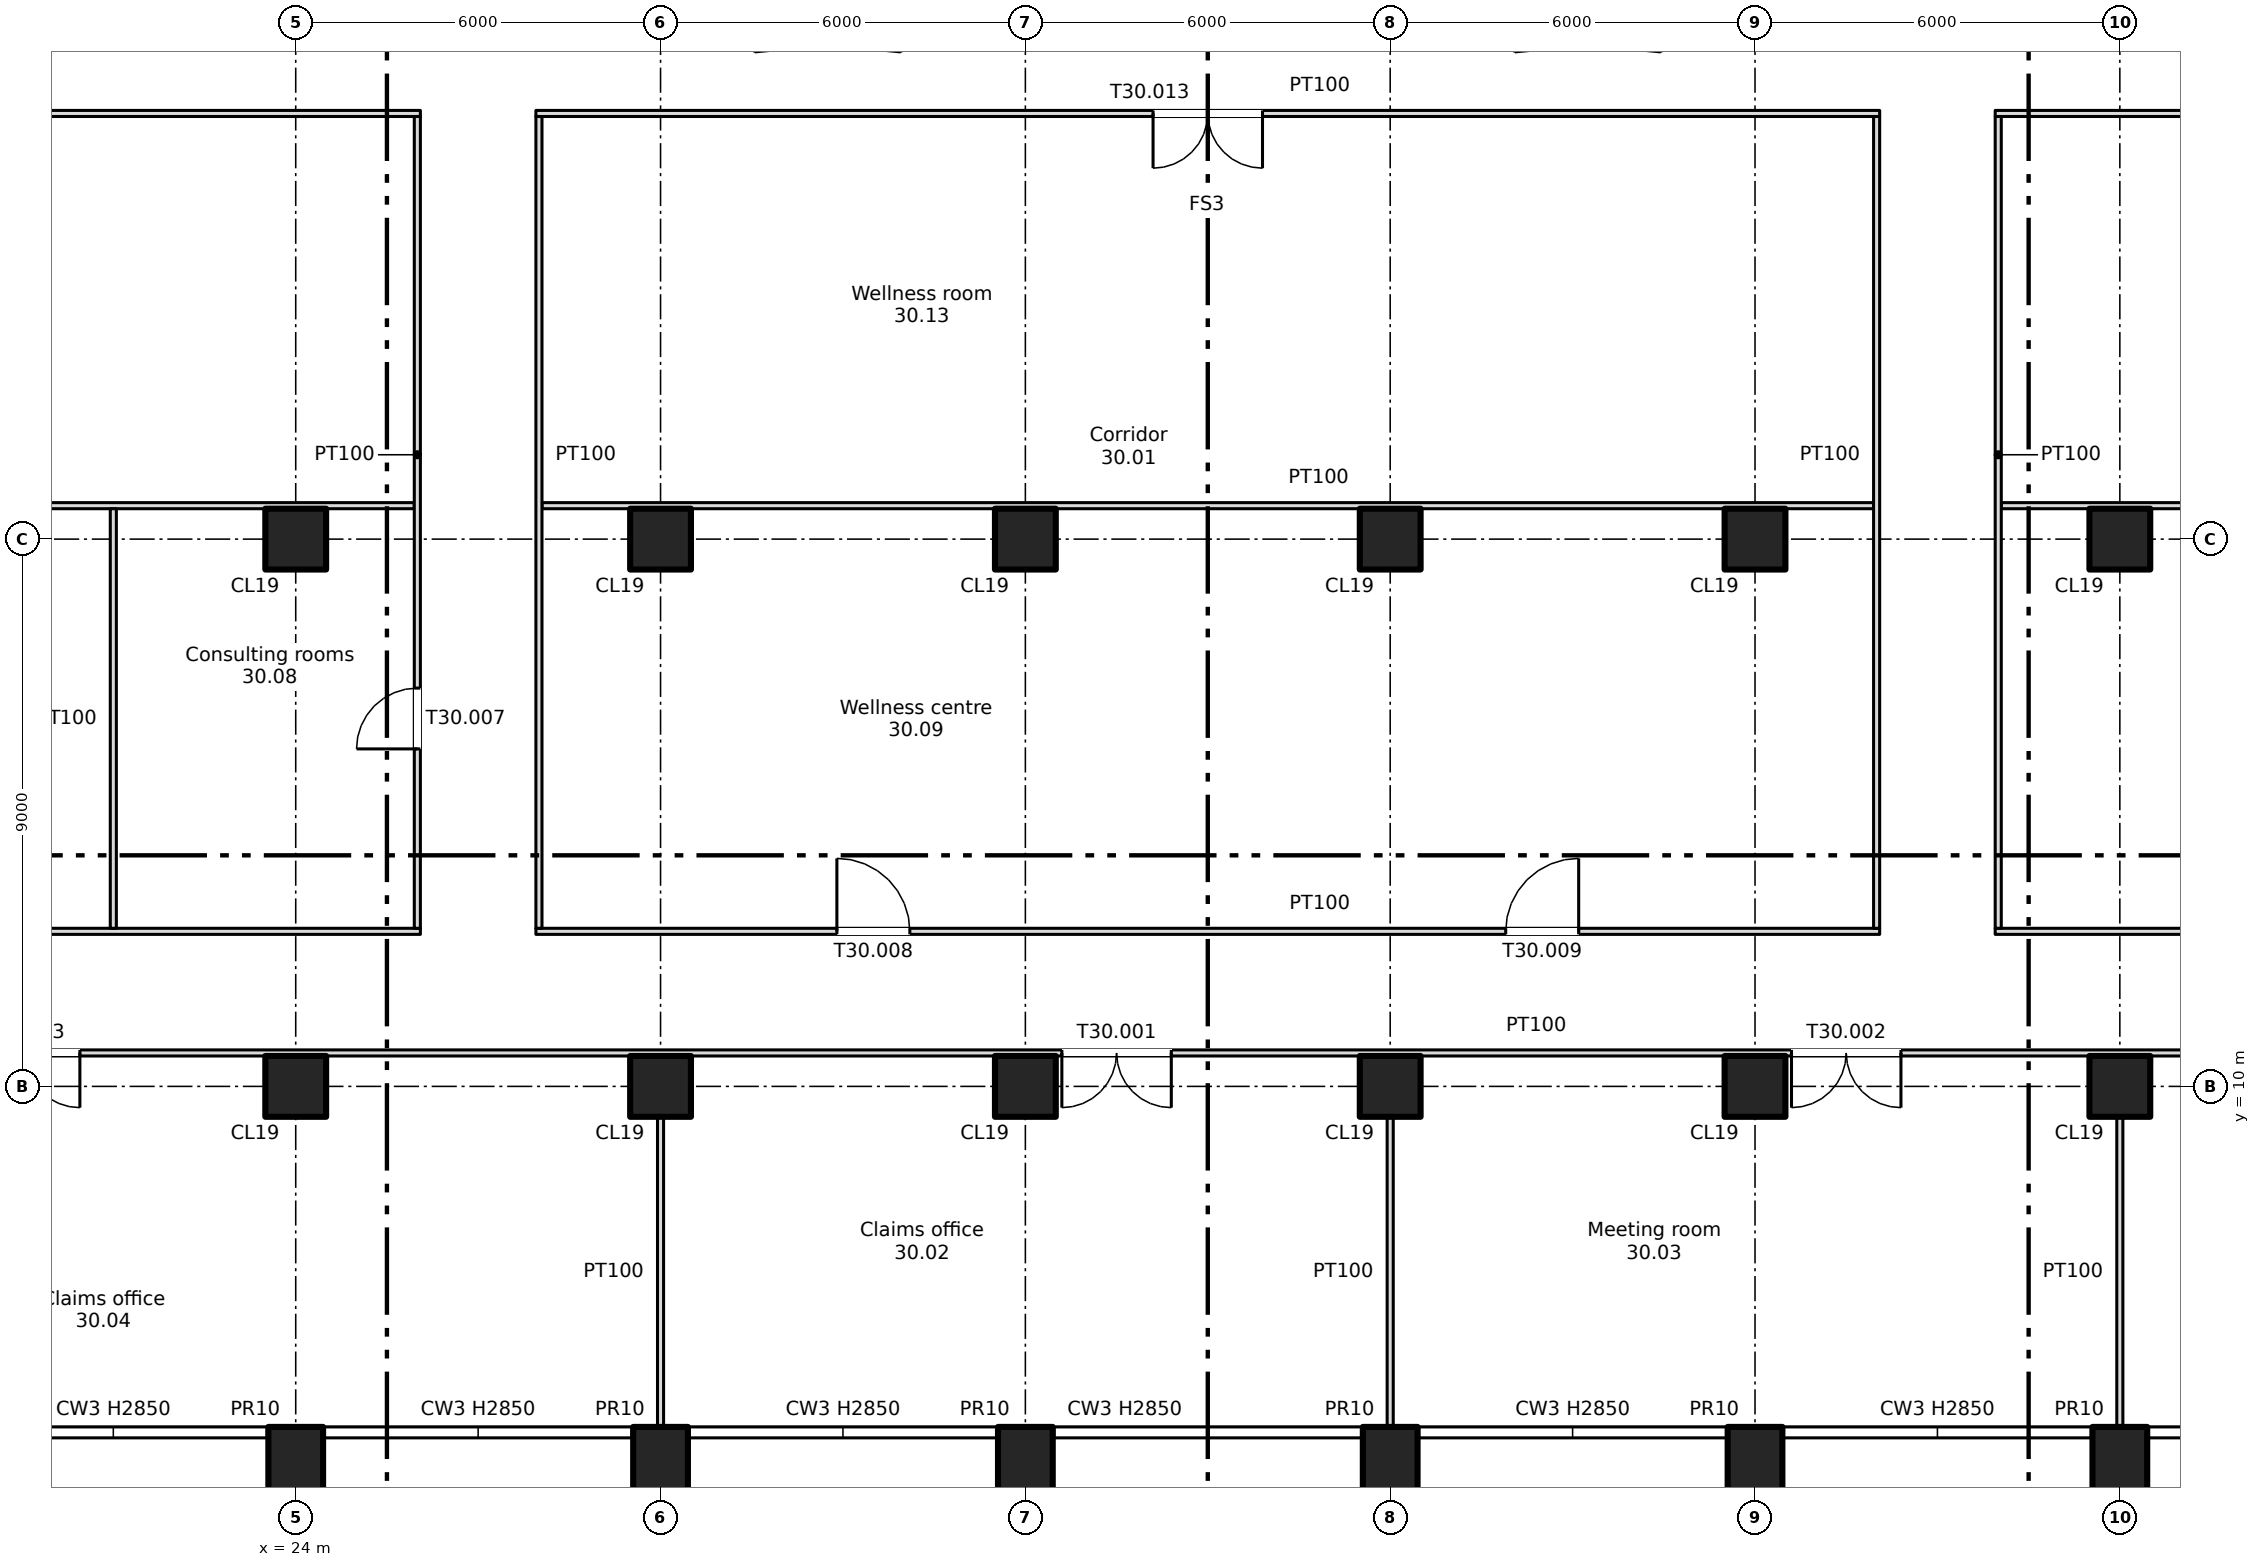
"""IFC4 building model, lengths in metres.
Left out: names, types, materials, properties, quantities, classifications, styles, units other than length and angle.
Written with IfcOpenShell. Run it as: python <this file> out.ifc"""

import sys

from ifc_helpers import new_model, si_unit, direction, frame, frame_2d, origin, origin_2d, place, context, subcontext, project, spatial, rectangle, extrude, element, fill, save


model = new_model("IFC4")
c1 = context("Model", 3, precision=1e-05, world=origin(), true_north=direction((0.0, 1.0)))
c2 = subcontext(c1, "Body", "Model", "MODEL_VIEW")
j1 = project(units=[si_unit("LENGTHUNIT", "METRE"), si_unit("PLANEANGLEUNIT", "RADIAN")], contexts=[c1])
p1 = place(None, origin())
s1 = spatial("IfcSite", under=j1, at=p1, CompositionType="ELEMENT")
p2 = place(p1, origin())
s2 = spatial("IfcBuilding", under=s1, at=p2, CompositionType="ELEMENT")
p3 = place(p2, frame((0.0, 0.0, 211.75)))
s3 = spatial("IfcBuildingStorey", under=s2, at=p3, CompositionType="ELEMENT", Elevation=211.75)
for number, where, z_axis, x_axis in (
    (1, (24.0, 3.7, -0.4), (0.0, 0.0, 1.0), (1.0, 0.0, 0.0)),
    (2, (30.0, 3.7, -0.4), (0.0, 0.0, 1.0), (1.0, 0.0, 0.0)),
    (3, (36.0, 3.7, -0.4), (0.0, 0.0, 1.0), (1.0, 0.0, 0.0)),
    (4, (42.0, 3.7, -0.4), (0.0, 0.0, 1.0), (1.0, 0.0, 0.0)),
    (5, (48.0, 3.7, -0.4), (0.0, 0.0, 1.0), (1.0, 0.0, 0.0)),
    (6, (54.0, 3.7, -0.4), (0.0, 0.0, 1.0), (1.0, 0.0, 0.0)),
):
    element("IfcColumn", number, at=place(p3, frame(where, z_axis=z_axis, x_axis=x_axis)), inside=s3, PredefinedType="COLUMN", context=c2, shape_type="SweptSolid", body=[
        extrude(rectangle(XDim=0.9, YDim=1.4, at=origin_2d()), origin(), (0.0, 0.0, 1.0), 3.75),
    ])
for number, where, z_axis, x_axis in (
    (7, (24.0, 10.0, 0.0), (0.0, 0.0, 1.0), (1.0, 0.0, 0.0)),
    (8, (24.0, 19.0, 0.0), (0.0, 0.0, 1.0), (1.0, 0.0, 0.0)),
    (9, (30.0, 10.0, 0.0), (0.0, 0.0, 1.0), (1.0, 0.0, 0.0)),
    (10, (30.0, 19.0, 0.0), (0.0, 0.0, 1.0), (1.0, 0.0, 0.0)),
    (11, (36.0, 10.0, 0.0), (0.0, 0.0, 1.0), (1.0, 0.0, 0.0)),
    (12, (36.0, 19.0, 0.0), (0.0, 0.0, 1.0), (1.0, 0.0, 0.0)),
    (13, (42.0, 10.0, 0.0), (0.0, 0.0, 1.0), (1.0, 0.0, 0.0)),
    (14, (42.0, 19.0, 0.0), (0.0, 0.0, 1.0), (1.0, 0.0, 0.0)),
    (15, (48.0, 10.0, 0.0), (0.0, 0.0, 1.0), (1.0, 0.0, 0.0)),
    (16, (48.0, 19.0, 0.0), (0.0, 0.0, 1.0), (1.0, 0.0, 0.0)),
    (17, (54.0, 10.0, 0.0), (0.0, 0.0, 1.0), (1.0, 0.0, 0.0)),
    (18, (54.0, 19.0, 0.0), (0.0, 0.0, 1.0), (1.0, 0.0, 0.0)),
):
    element("IfcColumn", number, at=place(p3, frame(where, z_axis=z_axis, x_axis=x_axis)), inside=s3, PredefinedType="COLUMN", context=c2, shape_type="SweptSolid", body=[
        extrude(rectangle(XDim=1.0, YDim=1.0, at=origin_2d()), origin(), (0.0, 0.0, 1.0), 3.35),
    ])
p4 = place(p3, frame((6.6, 10.55, 0.0), z_axis=(0.0, 0.0, 1.0), x_axis=(1.0, 0.0, 0.0)))
e19 = element("IfcWall", 19, at=p4, inside=s3, PredefinedType="PARTITIONING", context=c2, shape_type="SweptSolid", body=[
    extrude(rectangle(XDim=64.8, YDim=0.1, at=frame_2d((32.4, 0.0))), origin(), (0.0, 0.0, 1.0), 3.35),
])
p5 = place(p4, frame((30.0, 0.0, 0.0)))
e20 = element("IfcOpeningElement", 20, at=p5, cuts=e19, PredefinedType="OPENING", context=c2, shape_type="SweptSolid", body=[
    extrude(rectangle(XDim=1.8, YDim=2.1, at=frame_2d((0.9, 1.05))), frame((0.0, 0.06, 0.0), z_axis=(0.0, -1.0, 0.0), x_axis=(1.0, 0.0, 0.0)), (0.0, 0.0, 1.0), 0.12),
])
p6 = place(p4, frame((42.0, 0.0, 0.0)))
e21 = element("IfcOpeningElement", 21, at=p6, cuts=e19, PredefinedType="OPENING", context=c2, shape_type="SweptSolid", body=[
    extrude(rectangle(XDim=1.8, YDim=2.1, at=frame_2d((0.9, 1.05))), frame((0.0, 0.06, 0.0), z_axis=(0.0, -1.0, 0.0), x_axis=(1.0, 0.0, 0.0)), (0.0, 0.0, 1.0), 0.12),
])
p7 = place(p4, frame((12.05, 0.0, 0.0)))
e22 = element("IfcOpeningElement", 22, at=p7, cuts=e19, PredefinedType="OPENING", context=c2, shape_type="SweptSolid", body=[
    extrude(rectangle(XDim=1.8, YDim=2.1, at=frame_2d((0.9, 1.05))), frame((0.0, 0.06, 0.0), z_axis=(0.0, -1.0, 0.0), x_axis=(1.0, 0.0, 0.0)), (0.0, 0.0, 1.0), 0.12),
])
p8 = place(p4, frame((55.2, 0.0, 0.0)))
e23 = element("IfcOpeningElement", 23, at=p8, cuts=e19, PredefinedType="OPENING", context=c2, shape_type="SweptSolid", body=[
    extrude(rectangle(XDim=1.8, YDim=2.1, at=frame_2d((0.9, 1.05))), frame((0.0, 0.06, 0.0), z_axis=(0.0, -1.0, 0.0), x_axis=(1.0, 0.0, 0.0)), (0.0, 0.0, 1.0), 0.12),
])
p9 = place(p3, frame((6.6, 12.55, 0.0), z_axis=(0.0, 0.0, 1.0), x_axis=(1.0, 0.0, 0.0)))
e24 = element("IfcWall", 24, at=p9, inside=s3, PredefinedType="PARTITIONING", context=c2, shape_type="SweptSolid", body=[
    extrude(rectangle(XDim=19.45, YDim=0.1, at=frame_2d((9.725, 0.0))), origin(), (0.0, 0.0, 1.0), 3.35),
])
p10 = place(p9, frame((2.2, 0.0, 0.0)))
e25 = element("IfcOpeningElement", 25, at=p10, cuts=e24, PredefinedType="OPENING", context=c2, shape_type="SweptSolid", body=[
    extrude(rectangle(XDim=1.0, YDim=2.1, at=frame_2d((0.5, 1.05))), frame((0.0, 0.06, 0.0), z_axis=(0.0, -1.0, 0.0), x_axis=(1.0, 0.0, 0.0)), (0.0, 0.0, 1.0), 0.12),
])
p11 = place(p9, frame((9.0, 0.0, 0.0)))
e26 = element("IfcOpeningElement", 26, at=p11, cuts=e24, PredefinedType="OPENING", context=c2, shape_type="SweptSolid", body=[
    extrude(rectangle(XDim=1.8, YDim=2.1, at=frame_2d((0.9, 1.05))), frame((0.0, 0.06, 0.0), z_axis=(0.0, -1.0, 0.0), x_axis=(1.0, 0.0, 0.0)), (0.0, 0.0, 1.0), 0.12),
])
p12 = place(p3, frame((27.95, 12.55, 0.0), z_axis=(0.0, 0.0, 1.0), x_axis=(1.0, 0.0, 0.0)))
e27 = element("IfcWall", 27, at=p12, inside=s3, PredefinedType="PARTITIONING", context=c2, shape_type="SweptSolid", body=[
    extrude(rectangle(XDim=22.1, YDim=0.1, at=frame_2d((11.05, 0.0))), origin(), (0.0, 0.0, 1.0), 3.35),
])
p13 = place(p12, frame((4.95, 0.0, 0.0)))
e28 = element("IfcOpeningElement", 28, at=p13, cuts=e27, PredefinedType="OPENING", context=c2, shape_type="SweptSolid", body=[
    extrude(rectangle(XDim=1.2, YDim=2.1, at=frame_2d((0.6, 1.05))), frame((0.0, 0.06, 0.0), z_axis=(0.0, -1.0, 0.0), x_axis=(1.0, 0.0, 0.0)), (0.0, 0.0, 1.0), 0.12),
])
p14 = place(p12, frame((15.95, 0.0, 0.0)))
e29 = element("IfcOpeningElement", 29, at=p14, cuts=e27, PredefinedType="OPENING", context=c2, shape_type="SweptSolid", body=[
    extrude(rectangle(XDim=1.2, YDim=2.1, at=frame_2d((0.6, 1.05))), frame((0.0, 0.06, 0.0), z_axis=(0.0, -1.0, 0.0), x_axis=(1.0, 0.0, 0.0)), (0.0, 0.0, 1.0), 0.12),
])
p15 = place(p3, frame((51.95, 12.55, 0.0), z_axis=(0.0, 0.0, 1.0), x_axis=(1.0, 0.0, 0.0)))
e30 = element("IfcWall", 30, at=p15, inside=s3, PredefinedType="PARTITIONING", context=c2, shape_type="SweptSolid", body=[
    extrude(rectangle(XDim=19.45, YDim=0.1, at=frame_2d((9.725, 0.0))), origin(), (0.0, 0.0, 1.0), 3.35),
])
p16 = place(p15, frame((4.65, 0.0, 0.0)))
e31 = element("IfcOpeningElement", 31, at=p16, cuts=e30, PredefinedType="OPENING", context=c2, shape_type="SweptSolid", body=[
    extrude(rectangle(XDim=1.8, YDim=2.1, at=frame_2d((0.9, 1.05))), frame((0.0, 0.06, 0.0), z_axis=(0.0, -1.0, 0.0), x_axis=(1.0, 0.0, 0.0)), (0.0, 0.0, 1.0), 0.12),
])
p17 = place(p15, frame((14.75, 0.0, 0.0)))
e32 = element("IfcOpeningElement", 32, at=p17, cuts=e30, PredefinedType="OPENING", context=c2, shape_type="SweptSolid", body=[
    extrude(rectangle(XDim=1.0, YDim=2.1, at=frame_2d((0.5, 1.05))), frame((0.0, 0.06, 0.0), z_axis=(0.0, -1.0, 0.0), x_axis=(1.0, 0.0, 0.0)), (0.0, 0.0, 1.0), 0.12),
])
p18 = place(p3, frame((6.6, 19.55, 0.0), z_axis=(0.0, 0.0, 1.0), x_axis=(1.0, 0.0, 0.0)))
e33 = element("IfcWall", 33, at=p18, inside=s3, PredefinedType="PARTITIONING", context=c2, shape_type="SweptSolid", body=[
    extrude(rectangle(XDim=19.35, YDim=0.1, at=frame_2d((9.675, 0.0))), origin(), (0.0, 0.0, 1.0), 3.35),
])
p19 = place(p3, frame((28.05, 19.55, 0.0), z_axis=(0.0, 0.0, 1.0), x_axis=(1.0, 0.0, 0.0)))
e34 = element("IfcWall", 34, at=p19, inside=s3, PredefinedType="PARTITIONING", context=c2, shape_type="SweptSolid", body=[
    extrude(rectangle(XDim=21.9, YDim=0.1, at=frame_2d((10.95, 0.0))), origin(), (0.0, 0.0, 1.0), 3.35),
])
p20 = place(p3, frame((52.05, 19.55, 0.0), z_axis=(0.0, 0.0, 1.0), x_axis=(1.0, 0.0, 0.0)))
e35 = element("IfcWall", 35, at=p20, inside=s3, PredefinedType="PARTITIONING", context=c2, shape_type="SweptSolid", body=[
    extrude(rectangle(XDim=19.35, YDim=0.1, at=frame_2d((9.675, 0.0))), origin(), (0.0, 0.0, 1.0), 3.35),
])
p21 = place(p3, frame((6.6, 26.0, 0.0), z_axis=(0.0, 0.0, 1.0), x_axis=(1.0, 0.0, 0.0)))
e36 = element("IfcWall", 36, at=p21, inside=s3, PredefinedType="PARTITIONING", context=c2, shape_type="SweptSolid", body=[
    extrude(rectangle(XDim=19.45, YDim=0.1, at=frame_2d((9.725, 0.0))), origin(), (0.0, 0.0, 1.0), 3.35),
])
p22 = place(p21, frame((8.8, 0.0, 0.0)))
e37 = element("IfcOpeningElement", 37, at=p22, cuts=e36, PredefinedType="OPENING", context=c2, shape_type="SweptSolid", body=[
    extrude(rectangle(XDim=1.8, YDim=2.1, at=frame_2d((0.9, 1.05))), frame((0.0, 0.06, 0.0), z_axis=(0.0, -1.0, 0.0), x_axis=(1.0, 0.0, 0.0)), (0.0, 0.0, 1.0), 0.12),
])
p23 = place(p3, frame((27.95, 26.0, 0.0), z_axis=(0.0, 0.0, 1.0), x_axis=(1.0, 0.0, 0.0)))
e38 = element("IfcWall", 38, at=p23, inside=s3, PredefinedType="PARTITIONING", context=c2, shape_type="SweptSolid", body=[
    extrude(rectangle(XDim=22.1, YDim=0.1, at=frame_2d((11.05, 0.0))), origin(), (0.0, 0.0, 1.0), 3.35),
])
p24 = place(p23, frame((10.15, 0.0, 0.0)))
e39 = element("IfcOpeningElement", 39, at=p24, cuts=e38, PredefinedType="OPENING", context=c2, shape_type="SweptSolid", body=[
    extrude(rectangle(XDim=1.8, YDim=2.1, at=frame_2d((0.9, 1.05))), frame((0.0, 0.06, 0.0), z_axis=(0.0, -1.0, 0.0), x_axis=(1.0, 0.0, 0.0)), (0.0, 0.0, 1.0), 0.12),
])
p25 = place(p3, frame((51.95, 26.0, 0.0), z_axis=(0.0, 0.0, 1.0), x_axis=(1.0, 0.0, 0.0)))
e40 = element("IfcWall", 40, at=p25, inside=s3, PredefinedType="PARTITIONING", context=c2, shape_type="SweptSolid", body=[
    extrude(rectangle(XDim=19.45, YDim=0.1, at=frame_2d((9.725, 0.0))), origin(), (0.0, 0.0, 1.0), 3.35),
])
p26 = place(p25, frame((4.65, 0.0, 0.0)))
e41 = element("IfcOpeningElement", 41, at=p26, cuts=e40, PredefinedType="OPENING", context=c2, shape_type="SweptSolid", body=[
    extrude(rectangle(XDim=1.8, YDim=2.1, at=frame_2d((0.9, 1.05))), frame((0.0, 0.06, 0.0), z_axis=(0.0, -1.0, 0.0), x_axis=(1.0, 0.0, 0.0)), (0.0, 0.0, 1.0), 0.12),
])
p27 = place(p25, frame((14.75, 0.0, 0.0)))
e42 = element("IfcOpeningElement", 42, at=p27, cuts=e40, PredefinedType="OPENING", context=c2, shape_type="SweptSolid", body=[
    extrude(rectangle(XDim=1.0, YDim=2.1, at=frame_2d((0.5, 1.05))), frame((0.0, 0.06, 0.0), z_axis=(0.0, -1.0, 0.0), x_axis=(1.0, 0.0, 0.0)), (0.0, 0.0, 1.0), 0.12),
])
p28 = place(p3, frame((21.0, 12.6, 0.0), z_axis=(0.0, 0.0, 1.0), x_axis=(0.0, 1.0, 0.0)))
e43 = element("IfcWall", 43, at=p28, inside=s3, PredefinedType="PARTITIONING", context=c2, shape_type="SweptSolid", body=[
    extrude(rectangle(XDim=6.9, YDim=0.1, at=frame_2d((3.45, 0.0))), origin(), (0.0, 0.0, 1.0), 3.35),
])
p29 = place(p3, frame((26.0, 12.6, 0.0), z_axis=(0.0, 0.0, 1.0), x_axis=(0.0, 1.0, 0.0)))
e44 = element("IfcWall", 44, at=p29, inside=s3, PredefinedType="PARTITIONING", context=c2, shape_type="SweptSolid", body=[
    extrude(rectangle(XDim=13.35, YDim=0.1, at=frame_2d((6.675, 0.0))), origin(), (0.0, 0.0, 1.0), 3.35),
])
p30 = place(p29, frame((2.95, 0.0, 0.0)))
e45 = element("IfcOpeningElement", 45, at=p30, cuts=e44, PredefinedType="OPENING", context=c2, shape_type="SweptSolid", body=[
    extrude(rectangle(XDim=1.0, YDim=2.1, at=frame_2d((0.5, 1.05))), frame((0.0, 0.06, 0.0), z_axis=(0.0, -1.0, 0.0), x_axis=(1.0, 0.0, 0.0)), (0.0, 0.0, 1.0), 0.12),
])
p31 = place(p3, frame((28.0, 12.6, 0.0), z_axis=(0.0, 0.0, 1.0), x_axis=(0.0, 1.0, 0.0)))
e46 = element("IfcWall", 46, at=p31, inside=s3, PredefinedType="PARTITIONING", context=c2, shape_type="SweptSolid", body=[
    extrude(rectangle(XDim=13.35, YDim=0.1, at=frame_2d((6.675, 0.0))), origin(), (0.0, 0.0, 1.0), 3.35),
])
for number, where, z_axis, x_axis in (
    (47, (30.0, 4.4, 0.0), (0.0, 0.0, 1.0), (0.0, 1.0, 0.0)),
    (48, (42.0, 4.4, 0.0), (0.0, 0.0, 1.0), (0.0, 1.0, 0.0)),
):
    element("IfcWall", number, at=place(p3, frame(where, z_axis=z_axis, x_axis=x_axis)), inside=s3, PredefinedType="PARTITIONING", context=c2, shape_type="SweptSolid", body=[
        extrude(rectangle(XDim=5.1, YDim=0.1, at=frame_2d((2.55, 0.0))), origin(), (0.0, 0.0, 1.0), 3.35),
    ])
for number, where, z_axis, x_axis in (
    (49, (50.0, 12.6, 0.0), (0.0, 0.0, 1.0), (0.0, 1.0, 0.0)),
    (50, (52.0, 12.6, 0.0), (0.0, 0.0, 1.0), (0.0, 1.0, 0.0)),
):
    element("IfcWall", number, at=place(p3, frame(where, z_axis=z_axis, x_axis=x_axis)), inside=s3, PredefinedType="PARTITIONING", context=c2, shape_type="SweptSolid", body=[
        extrude(rectangle(XDim=13.35, YDim=0.1, at=frame_2d((6.675, 0.0))), origin(), (0.0, 0.0, 1.0), 3.35),
    ])
p32 = place(p3, frame((54.0, 4.4, 0.0), z_axis=(0.0, 0.0, 1.0), x_axis=(0.0, 1.0, 0.0)))
e51 = element("IfcWall", 51, at=p32, inside=s3, PredefinedType="PARTITIONING", context=c2, shape_type="SweptSolid", body=[
    extrude(rectangle(XDim=5.1, YDim=0.1, at=frame_2d((2.55, 0.0))), origin(), (0.0, 0.0, 1.0), 3.35),
])
p33 = place(p5, origin())
e52 = element("IfcDoor", 52, at=p33, inside=s3, OperationType="DOUBLE_DOOR_SINGLE_SWING", PredefinedType="DOOR", context=c2, shape_type="SweptSolid", body=[
    extrude(rectangle(XDim=1.8, YDim=2.1, at=frame_2d((0.9, 1.05))), frame((0.0, 0.025, 0.0), z_axis=(0.0, -1.0, 0.0), x_axis=(1.0, 0.0, 0.0)), (0.0, 0.0, 1.0), 0.05),
])
fill(e20, e52)
p34 = place(p6, origin())
e53 = element("IfcDoor", 53, at=p34, inside=s3, OperationType="DOUBLE_DOOR_SINGLE_SWING", PredefinedType="DOOR", context=c2, shape_type="SweptSolid", body=[
    extrude(rectangle(XDim=1.8, YDim=2.1, at=frame_2d((0.9, 1.05))), frame((0.0, 0.025, 0.0), z_axis=(0.0, -1.0, 0.0), x_axis=(1.0, 0.0, 0.0)), (0.0, 0.0, 1.0), 0.05),
])
fill(e21, e53)
p35 = place(p7, origin())
e54 = element("IfcDoor", 54, at=p35, inside=s3, OperationType="DOUBLE_DOOR_SINGLE_SWING", PredefinedType="DOOR", context=c2, shape_type="SweptSolid", body=[
    extrude(rectangle(XDim=1.8, YDim=2.1, at=frame_2d((0.9, 1.05))), frame((0.0, 0.025, 0.0), z_axis=(0.0, -1.0, 0.0), x_axis=(1.0, 0.0, 0.0)), (0.0, 0.0, 1.0), 0.05),
])
fill(e22, e54)
p36 = place(p30, origin())
e55 = element("IfcDoor", 55, at=p36, inside=s3, OperationType="SINGLE_SWING_LEFT", PredefinedType="DOOR", context=c2, shape_type="SweptSolid", body=[
    extrude(rectangle(XDim=1.0, YDim=2.1, at=frame_2d((0.5, 1.05))), frame((0.0, 0.025, 0.0), z_axis=(0.0, -1.0, 0.0), x_axis=(1.0, 0.0, 0.0)), (0.0, 0.0, 1.0), 0.05),
])
fill(e45, e55)
p37 = place(p13, origin())
e56 = element("IfcDoor", 56, at=p37, inside=s3, OperationType="SINGLE_SWING_LEFT", PredefinedType="DOOR", context=c2, shape_type="SweptSolid", body=[
    extrude(rectangle(XDim=1.2, YDim=2.1, at=frame_2d((0.6, 1.05))), frame((0.0, 0.025, 0.0), z_axis=(0.0, -1.0, 0.0), x_axis=(1.0, 0.0, 0.0)), (0.0, 0.0, 1.0), 0.05),
])
fill(e28, e56)
p38 = place(p14, origin())
e57 = element("IfcDoor", 57, at=p38, inside=s3, OperationType="SINGLE_SWING_RIGHT", PredefinedType="DOOR", context=c2, shape_type="SweptSolid", body=[
    extrude(rectangle(XDim=1.2, YDim=2.1, at=frame_2d((0.6, 1.05))), frame((0.0, 0.025, 0.0), z_axis=(0.0, -1.0, 0.0), x_axis=(1.0, 0.0, 0.0)), (0.0, 0.0, 1.0), 0.05),
])
fill(e29, e57)
p39 = place(p24, origin())
e58 = element("IfcDoor", 58, at=p39, inside=s3, OperationType="DOUBLE_DOOR_SINGLE_SWING", PredefinedType="DOOR", context=c2, shape_type="SweptSolid", body=[
    extrude(rectangle(XDim=1.8, YDim=2.1, at=frame_2d((0.9, 1.05))), frame((0.0, 0.025, 0.0), z_axis=(0.0, -1.0, 0.0), x_axis=(1.0, 0.0, 0.0)), (0.0, 0.0, 1.0), 0.05),
])
fill(e39, e58)
save(model, sys.argv[1])
